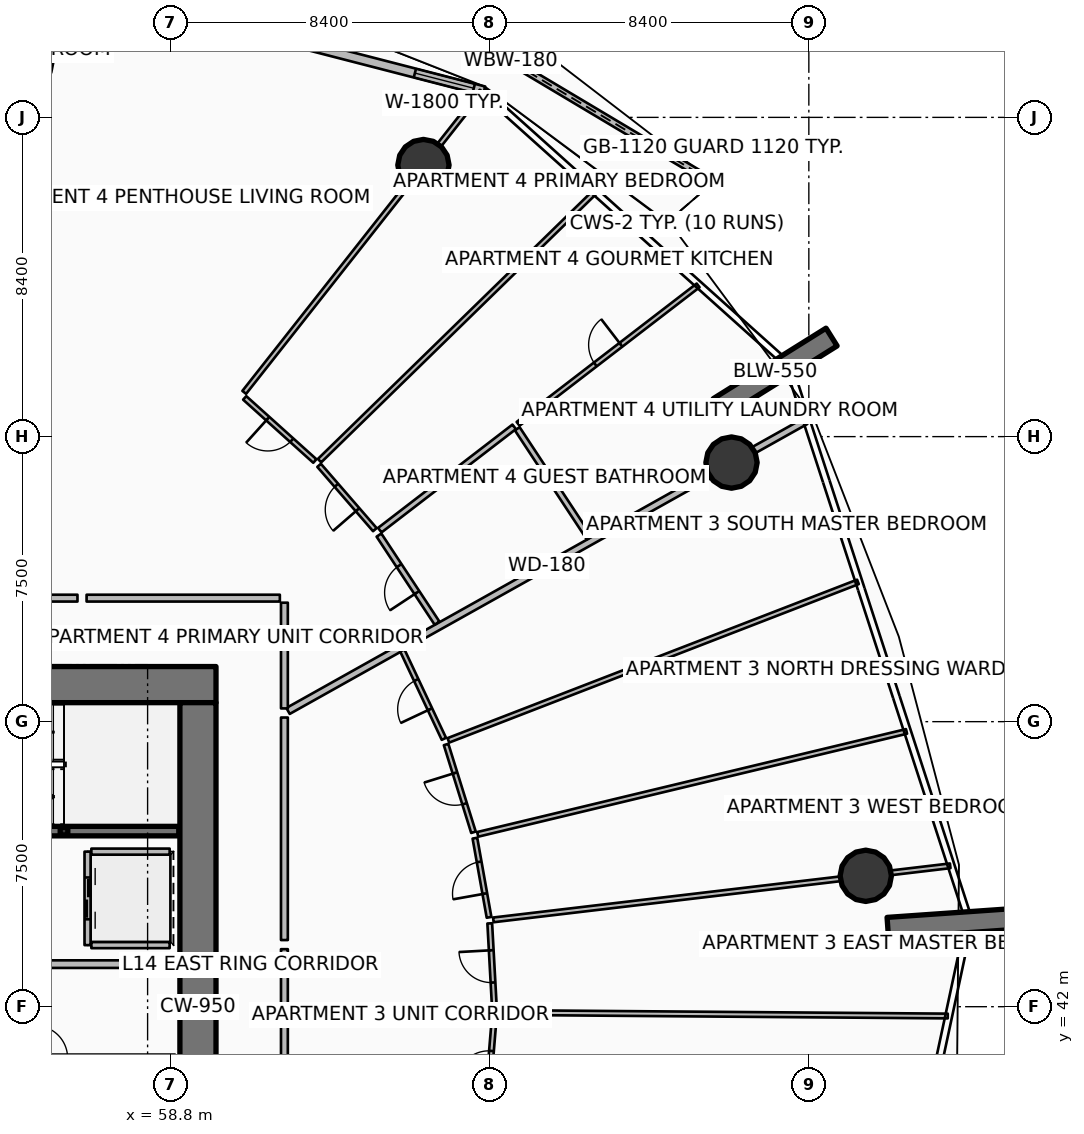
"""IFC4 building model, lengths in metres.
Left out: names, types, materials, properties, quantities, classifications, styles, units other than length and angle.
Written with IfcOpenShell. Run it as: python <this file> out.ifc"""

import sys

from ifc_helpers import new_model, si_unit, direction, frame, frame_2d, origin, origin_2d, place, context, subcontext, project, spatial, polyline, rectangle, hollow_rectangle, circle, outline, extrude, element, fill, save


model = new_model("IFC4")
c1 = context("Model", 3, precision=1e-05, world=origin(), true_north=direction((0.0, 1.0)))
c2 = subcontext(c1, "Body", "Model", "MODEL_VIEW")
j1 = project(units=[si_unit("LENGTHUNIT", "METRE"), si_unit("PLANEANGLEUNIT", "RADIAN")], contexts=[c1])
p1 = place(None, origin())
s1 = spatial("IfcSite", under=j1, at=p1, CompositionType="ELEMENT")
p2 = place(p1, origin())
s2 = spatial("IfcBuilding", under=s1, at=p2, CompositionType="ELEMENT")
p3 = place(p2, frame((0.0, 0.0, 60.15)))
s3 = spatial("IfcBuildingStorey", under=s2, at=p3, CompositionType="ELEMENT", Elevation=60.15)
p4 = place(p3, frame((49.95, 50.475, 0.0), z_axis=(0.0, 0.0, 1.0), x_axis=(1.0, 0.0, 0.0)))
e1 = element("IfcWall", 1, at=p4, inside=s3, PredefinedType="SHEAR", context=c2, shape_type="SweptSolid", body=[
    extrude(rectangle(XDim=10.05, YDim=0.95, at=frame_2d((5.025, 0.0))), origin(), (0.0, 0.0, 1.0), 3.75),
])
p5 = place(p3, frame((59.525, 34.0, 0.0), z_axis=(0.0, 0.0, 1.0), x_axis=(0.0, 1.0, 0.0)))
e2 = element("IfcWall", 2, at=p5, inside=s3, PredefinedType="SHEAR", context=c2, shape_type="SweptSolid", body=[
    extrude(rectangle(XDim=16.0, YDim=0.95, at=frame_2d((8.0, 0.0))), origin(), (0.0, 0.0, 1.0), 3.75),
])
p6 = place(p3, frame((56.0, 46.62, 0.0), z_axis=(0.0, 0.0, 1.0), x_axis=(1.0, 0.0, 0.0)))
e3 = element("IfcColumn", 3, at=p6, inside=s3, PredefinedType="COLUMN", context=c2, shape_type="SweptSolid", body=[
    extrude(hollow_rectangle(XDim=0.2, YDim=0.2, WallThickness=0.01, InnerFilletRadius=0.01, OuterFilletRadius=0.02, at=origin_2d()), origin(), (0.0, 0.0, 1.0), 1.67),
])
for number, where, z_axis, x_axis in (
    (4, (73.23, 57.765, 0.0), (0.0, 0.0, 1.0), (0.848, 0.53, 0.0)),
    (5, (77.678, 44.075, 0.0), (0.0, 0.0, 1.0), (0.998, 0.07, 0.0)),
):
    element("IfcWall", number, at=place(p3, frame(where, z_axis=z_axis, x_axis=x_axis)), inside=s3, PredefinedType="SOLIDWALL", context=c2, shape_type="SweptSolid", body=[
        extrude(rectangle(XDim=3.5, YDim=0.55, at=frame_2d((1.75, 0.0))), origin(), (0.0, 0.0, 1.0), 3.75),
    ])
for number, where, z_axis, x_axis in (
    (6, (73.565, 56.317, 0.0), (0.0, 0.0, 1.0), (1.0, 0.0, 0.0)),
    (7, (65.458, 64.146, 0.0), (0.0, 0.0, 1.0), (1.0, 0.0, 0.0)),
    (8, (77.098, 45.444, 0.0), (0.0, 0.0, 1.0), (1.0, 0.0, 0.0)),
):
    element("IfcColumn", number, at=place(p3, frame(where, z_axis=z_axis, x_axis=x_axis)), inside=s3, PredefinedType="COLUMN", context=c2, shape_type="SweptSolid", body=[
        extrude(circle(Radius=0.675, at=origin_2d()), origin(), (0.0, 0.0, 1.0), 3.5),
    ])
p7 = place(p3, frame((73.087, 63.693, 0.0), z_axis=(0.0, 0.0, 1.0), x_axis=(-0.858860948387, 0.512208816144, 0.0)))
e9 = element("IfcWall", 9, at=p7, inside=s3, PredefinedType="PARAPET", context=c2, shape_type="SweptSolid", body=[
    extrude(outline(polyline([(0.0, 0.0), (12.412, 0.0), (12.412, 1.348), (6.206, 1.182), (0.0, 1.12), (0.0, 0.0)])), frame((0.0, 0.09, 0.0), z_axis=(0.0, -1.0, 0.0), x_axis=(1.0, 0.0, 0.0)), (0.0, 0.0, 1.0), 0.18),
])
p8 = place(p3, frame((67.054, 66.096, 0.0), z_axis=(0.0, 0.0, 1.0), x_axis=(-0.96833871487, 0.249640007378, 0.0)))
e10 = element("IfcWall", 10, at=p8, inside=s3, PredefinedType="SOLIDWALL", context=c2, shape_type="SweptSolid", body=[
    extrude(rectangle(XDim=11.851, YDim=0.24, at=frame_2d((5.926, 0.0))), origin(), (0.0, 0.0, 1.0), 2.45),
])
p9 = place(p8, frame((9.631, 0.0, 0.0)))
e11 = element("IfcOpeningElement", 11, at=p9, cuts=e10, PredefinedType="OPENING", context=c2, shape_type="SweptSolid", body=[
    extrude(rectangle(XDim=1.45, YDim=2.15, at=frame_2d((0.725, 1.075))), frame((0.0, 0.13, 0.0), z_axis=(0.0, -1.0, 0.0), x_axis=(1.0, 0.0, 0.0)), (0.0, 0.0, 1.0), 0.26),
])
p10 = place(p8, frame((0.28, 0.0, 0.65)))
e12 = element("IfcOpeningElement", 12, at=p10, cuts=e10, PredefinedType="OPENING", context=c2, shape_type="SweptSolid", body=[
    extrude(rectangle(XDim=1.6, YDim=1.5, at=frame_2d((0.8, 0.75))), frame((0.0, 0.13, 0.0), z_axis=(0.0, -1.0, 0.0), x_axis=(1.0, 0.0, 0.0)), (0.0, 0.0, 1.0), 0.26),
])
p11 = place(p3, frame((51.48, 46.62, 0.0), z_axis=(0.0, 0.0, 1.0), x_axis=(1.0, 0.0, 0.0)))
e13 = element("IfcWall", 13, at=p11, inside=s3, PredefinedType="SOLIDWALL", context=c2, shape_type="SweptSolid", body=[
    extrude(rectangle(XDim=7.54, YDim=0.25, at=frame_2d((3.77, 0.0))), origin(), (0.0, 0.0, 1.0), 3.5),
])
p12 = place(p11, frame((0.3, 0.0, 0.0)))
e14 = element("IfcOpeningElement", 14, at=p12, cuts=e13, PredefinedType="OPENING", context=c2, shape_type="SweptSolid", body=[
    extrude(rectangle(XDim=1.55, YDim=2.15, at=frame_2d((0.775, 1.075))), frame((0.0, 0.135, 0.0), z_axis=(0.0, -1.0, 0.0), x_axis=(1.0, 0.0, 0.0)), (0.0, 0.0, 1.0), 0.27),
])
p13 = place(p3, frame((56.62, 46.08, 0.0), z_axis=(0.0, 0.0, 1.0), x_axis=(0.0, -1.0, 0.0)))
e15 = element("IfcWall", 15, at=p13, inside=s3, PredefinedType="PARTITIONING", context=c2, shape_type="SweptSolid", body=[
    extrude(rectangle(XDim=2.46, YDim=0.16, at=frame_2d((1.23, 0.0))), origin(), (0.0, 0.0, 1.0), 3.5),
])
p14 = place(p13, frame((0.68, 0.0, 0.0)))
e16 = element("IfcOpeningElement", 16, at=p14, cuts=e15, PredefinedType="OPENING", context=c2, shape_type="SweptSolid", body=[
    extrude(rectangle(XDim=1.1, YDim=2.1, at=frame_2d((0.55, 1.05))), frame((0.0, 0.09, 0.0), z_axis=(0.0, -1.0, 0.0), x_axis=(1.0, 0.0, 0.0)), (0.0, 0.0, 1.0), 0.18),
])
for number, where, z_axis, x_axis in (
    (17, (56.72, 46.08, 0.0), (0.0, 0.0, 1.0), (1.0, 0.0, 0.0)),
    (18, (56.72, 43.62, 0.0), (0.0, 0.0, 1.0), (1.0, 0.0, 0.0)),
):
    element("IfcWall", number, at=place(p3, frame(where, z_axis=z_axis, x_axis=x_axis)), inside=s3, PredefinedType="PARTITIONING", context=c2, shape_type="SweptSolid", body=[
        extrude(rectangle(XDim=2.06, YDim=0.16, at=frame_2d((1.03, 0.0))), origin(), (0.0, 0.0, 1.0), 3.5),
    ])
p15 = place(p3, frame((50.12, 43.12, 0.0), z_axis=(0.0, 0.0, 1.0), x_axis=(1.0, 0.0, 0.0)))
e19 = element("IfcWall", 19, at=p15, inside=s3, PredefinedType="PARTITIONING", context=c2, shape_type="SweptSolid", body=[
    extrude(rectangle(XDim=8.88, YDim=0.2, at=frame_2d((4.44, 0.0))), origin(), (0.0, 0.0, 1.0), 3.5),
])
p16 = place(p3, frame((61.896, 49.782, 0.0), z_axis=(0.0, 0.0, 1.0), x_axis=(0.872493215695, 0.488626225828, 0.0)))
e20 = element("IfcWall", 20, at=p16, inside=s3, PredefinedType="PARTITIONING", context=c2, shape_type="SweptSolid", body=[
    extrude(rectangle(XDim=15.612, YDim=0.18, at=frame_2d((7.806, 0.0))), origin(), (0.0, 0.0, 1.0), 2.867),
])
p17 = place(p3, frame((61.8, 38.228, 0.0), z_axis=(0.0, 0.0, 1.0), x_axis=(0.0, 1.0, 0.0)))
e21 = element("IfcWall", 21, at=p17, inside=s3, PredefinedType="PARTITIONING", context=c2, shape_type="SweptSolid", body=[
    extrude(rectangle(XDim=5.285, YDim=0.18, at=frame_2d((2.643, 0.0))), origin(), (0.0, 0.0, 1.0), 2.867),
])
p18 = place(p3, frame((67.422, 41.847, 0.0), z_axis=(0.0, 0.0, 1.0), x_axis=(0.999969106173, -0.007860451618, 0.0)))
e22 = element("IfcWall", 22, at=p18, inside=s3, PredefinedType="PARTITIONING", context=c2, shape_type="SweptSolid", body=[
    extrude(rectangle(XDim=11.833, YDim=0.125, at=frame_2d((5.917, 0.0))), origin(), (0.0, 0.0, 1.0), 2.94),
])
p19 = place(p3, frame((67.102, 39.055, 0.0), z_axis=(0.0, 0.0, 1.0), x_axis=(0.082325550285, 0.996605490538, 0.0)))
e23 = element("IfcWall", 23, at=p19, inside=s3, PredefinedType="PARTITIONING", context=c2, shape_type="SweptSolid", body=[
    extrude(rectangle(XDim=2.722, YDim=0.125, at=frame_2d((1.361, 0.0))), origin(), (0.0, 0.0, 1.0), 2.94),
])
p20 = place(p19, frame((0.936, 0.0, 0.0)))
e24 = element("IfcOpeningElement", 24, at=p20, cuts=e23, PredefinedType="OPENING", context=c2, shape_type="SweptSolid", body=[
    extrude(rectangle(XDim=0.85, YDim=2.06, at=frame_2d((0.425, 1.03))), frame((0.0, 0.073, 0.0), z_axis=(0.0, -1.0, 0.0), x_axis=(1.0, 0.0, 0.0)), (0.0, 0.0, 1.0), 0.145),
])
p21 = place(p3, frame((67.328, 41.928, 0.0), z_axis=(0.0, 0.0, 1.0), x_axis=(-0.054903584575, 0.998491660657, 0.0)))
e25 = element("IfcWall", 25, at=p21, inside=s3, PredefinedType="PARTITIONING", context=c2, shape_type="SweptSolid", body=[
    extrude(rectangle(XDim=2.268, YDim=0.125, at=frame_2d((1.134, 0.0))), origin(), (0.0, 0.0, 1.0), 2.867),
])
p22 = place(p21, frame((0.709, 0.0, 0.0)))
e26 = element("IfcOpeningElement", 26, at=p22, cuts=e25, PredefinedType="OPENING", context=c2, shape_type="SweptSolid", body=[
    extrude(rectangle(XDim=0.85, YDim=2.06, at=frame_2d((0.425, 1.03))), frame((0.0, 0.073, 0.0), z_axis=(0.0, -1.0, 0.0), x_axis=(1.0, 0.0, 0.0)), (0.0, 0.0, 1.0), 0.145),
])
p23 = place(p3, frame((61.8, 43.753, 0.0), z_axis=(0.0, 0.0, 1.0), x_axis=(0.0, 1.0, 0.0)))
e27 = element("IfcWall", 27, at=p23, inside=s3, PredefinedType="PARTITIONING", context=c2, shape_type="SweptSolid", body=[
    extrude(rectangle(XDim=5.855, YDim=0.18, at=frame_2d((2.927, 0.0))), origin(), (0.0, 0.0, 1.0), 2.867),
])
p24 = place(p3, frame((67.298, 44.284, 0.0), z_axis=(0.0, 0.0, 1.0), x_axis=(0.993068589749, 0.117536275483, 0.0)))
e28 = element("IfcWall", 28, at=p24, inside=s3, PredefinedType="PARTITIONING", context=c2, shape_type="SweptSolid", body=[
    extrude(rectangle(XDim=12.106, YDim=0.125, at=frame_2d((6.053, 0.0))), origin(), (0.0, 0.0, 1.0), 2.867),
])
p25 = place(p3, frame((66.886, 46.534, 0.0), z_axis=(0.0, 0.0, 1.0), x_axis=(0.972368393799, 0.233451722507, 0.0)))
e29 = element("IfcWall", 29, at=p25, inside=s3, PredefinedType="PARTITIONING", context=c2, shape_type="SweptSolid", body=[
    extrude(rectangle(XDim=11.605, YDim=0.125, at=frame_2d((5.802, 0.0))), origin(), (0.0, 0.0, 1.0), 2.94),
])
p26 = place(p3, frame((66.115, 49.008, 0.0), z_axis=(0.0, 0.0, 1.0), x_axis=(0.932641955578, 0.360803246514, 0.0)))
e30 = element("IfcWall", 30, at=p26, inside=s3, PredefinedType="PARTITIONING", context=c2, shape_type="SweptSolid", body=[
    extrude(rectangle(XDim=11.556, YDim=0.125, at=frame_2d((5.778, 0.0))), origin(), (0.0, 0.0, 1.0), 2.94),
])
p27 = place(p3, frame((67.185, 44.351, 0.0), z_axis=(0.0, 0.0, 1.0), x_axis=(-0.175726743029, 0.984438983271, 0.0)))
e31 = element("IfcWall", 31, at=p27, inside=s3, PredefinedType="PARTITIONING", context=c2, shape_type="SweptSolid", body=[
    extrude(rectangle(XDim=2.116, YDim=0.125, at=frame_2d((1.058, 0.0))), origin(), (0.0, 0.0, 1.0), 2.867),
])
p28 = place(p27, frame((0.633, 0.0, 0.0)))
e32 = element("IfcOpeningElement", 32, at=p28, cuts=e31, PredefinedType="OPENING", context=c2, shape_type="SweptSolid", body=[
    extrude(rectangle(XDim=0.85, YDim=2.06, at=frame_2d((0.425, 1.03))), frame((0.0, 0.073, 0.0), z_axis=(0.0, -1.0, 0.0), x_axis=(1.0, 0.0, 0.0)), (0.0, 0.0, 1.0), 0.145),
])
p29 = place(p3, frame((66.775, 46.59, 0.0), z_axis=(0.0, 0.0, 1.0), x_axis=(-0.297792299564, 0.954630685826, 0.0)))
e33 = element("IfcWall", 33, at=p29, inside=s3, PredefinedType="PARTITIONING", context=c2, shape_type="SweptSolid", body=[
    extrude(rectangle(XDim=2.419, YDim=0.125, at=frame_2d((1.21, 0.0))), origin(), (0.0, 0.0, 1.0), 2.94),
])
p30 = place(p29, frame((0.785, 0.0, 0.0)))
e34 = element("IfcOpeningElement", 34, at=p30, cuts=e33, PredefinedType="OPENING", context=c2, shape_type="SweptSolid", body=[
    extrude(rectangle(XDim=0.85, YDim=2.06, at=frame_2d((0.425, 1.03))), frame((0.0, 0.073, 0.0), z_axis=(0.0, -1.0, 0.0), x_axis=(1.0, 0.0, 0.0)), (0.0, 0.0, 1.0), 0.145),
])
p31 = place(p3, frame((65.997, 49.048, 0.0), z_axis=(0.0, 0.0, 1.0), x_axis=(-0.425774166793, 0.904829463983, 0.0)))
e35 = element("IfcWall", 35, at=p31, inside=s3, PredefinedType="PARTITIONING", context=c2, shape_type="SweptSolid", body=[
    extrude(rectangle(XDim=2.571, YDim=0.125, at=frame_2d((1.285, 0.0))), origin(), (0.0, 0.0, 1.0), 2.867),
])
p32 = place(p31, frame((0.86, 0.0, 0.0)))
e36 = element("IfcOpeningElement", 36, at=p32, cuts=e35, PredefinedType="OPENING", context=c2, shape_type="SweptSolid", body=[
    extrude(rectangle(XDim=0.85, YDim=2.06, at=frame_2d((0.425, 1.03))), frame((0.0, 0.073, 0.0), z_axis=(0.0, -1.0, 0.0), x_axis=(1.0, 0.0, 0.0)), (0.0, 0.0, 1.0), 0.145),
])
p33 = place(p3, frame((56.354, 52.75, 0.0), z_axis=(0.0, 0.0, 1.0), x_axis=(-1.0, 0.0, 0.0)))
e37 = element("IfcWall", 37, at=p33, inside=s3, PredefinedType="PARTITIONING", context=c2, shape_type="SweptSolid", body=[
    extrude(rectangle(XDim=5.203, YDim=0.18, at=frame_2d((2.601, 0.0))), origin(), (0.0, 0.0, 1.0), 2.867),
])
p34 = place(p33, frame((2.052, 0.0, 0.0)))
e38 = element("IfcOpeningElement", 38, at=p34, cuts=e37, PredefinedType="OPENING", context=c2, shape_type="SweptSolid", body=[
    extrude(rectangle(XDim=1.1, YDim=2.1, at=frame_2d((0.55, 1.05))), frame((0.0, 0.1, 0.0), z_axis=(0.0, -1.0, 0.0), x_axis=(1.0, 0.0, 0.0)), (0.0, 0.0, 1.0), 0.2),
])
p35 = place(p3, frame((61.8, 49.848, 0.0), z_axis=(0.0, 0.0, 1.0), x_axis=(0.0, 1.0, 0.0)))
e39 = element("IfcWall", 39, at=p35, inside=s3, PredefinedType="PARTITIONING", context=c2, shape_type="SweptSolid", body=[
    extrude(rectangle(XDim=2.781, YDim=0.18, at=frame_2d((1.391, 0.0))), origin(), (0.0, 0.0, 1.0), 2.867),
])
p36 = place(p3, frame((61.68, 52.75, 0.0), z_axis=(0.0, 0.0, 1.0), x_axis=(-1.0, 0.0, 0.0)))
e40 = element("IfcWall", 40, at=p36, inside=s3, PredefinedType="PARTITIONING", context=c2, shape_type="SweptSolid", body=[
    extrude(rectangle(XDim=5.085, YDim=0.18, at=frame_2d((2.543, 0.0))), origin(), (0.0, 0.0, 1.0), 2.867),
])
p37 = place(p3, frame((60.743, 58.164, 0.0), z_axis=(0.0, 0.0, 1.0), x_axis=(0.61907620874, 0.785330916093, 0.0)))
e41 = element("IfcWall", 41, at=p37, inside=s3, PredefinedType="PARTITIONING", context=c2, shape_type="SweptSolid", body=[
    extrude(rectangle(XDim=10.091, YDim=0.125, at=frame_2d((5.046, 0.0))), origin(), (0.0, 0.0, 1.0), 2.867),
])
p38 = place(p3, frame((65.816, 52.092, 0.0), z_axis=(0.0, 0.0, 1.0), x_axis=(-0.550532146696, 0.834813964578, 0.0)))
e42 = element("IfcWall", 42, at=p38, inside=s3, PredefinedType="PARTITIONING", context=c2, shape_type="SweptSolid", body=[
    extrude(rectangle(XDim=2.776, YDim=0.15, at=frame_2d((1.388, 0.0))), origin(), (0.0, 0.0, 1.0), 2.867),
])
p39 = place(p38, frame((0.963, 0.0, 0.0)))
e43 = element("IfcOpeningElement", 43, at=p39, cuts=e42, PredefinedType="OPENING", context=c2, shape_type="SweptSolid", body=[
    extrude(rectangle(XDim=0.85, YDim=2.06, at=frame_2d((0.425, 1.03))), frame((0.0, 0.085, 0.0), z_axis=(0.0, -1.0, 0.0), x_axis=(1.0, 0.0, 0.0)), (0.0, 0.0, 1.0), 0.17),
])
p40 = place(p3, frame((69.821, 54.335, 0.0), z_axis=(0.0, 0.0, 1.0), x_axis=(-0.550516877558, 0.834824033868, 0.0)))
e44 = element("IfcWall", 44, at=p40, inside=s3, PredefinedType="PARTITIONING", context=c2, shape_type="SweptSolid", body=[
    extrude(rectangle(XDim=3.44, YDim=0.15, at=frame_2d((1.72, 0.0))), origin(), (0.0, 0.0, 1.0), 2.867),
])
p41 = place(p3, frame((64.31, 54.539, 0.0), z_axis=(0.0, 0.0, 1.0), x_axis=(0.792803030826, 0.609477935871, 0.0)))
e45 = element("IfcWall", 45, at=p41, inside=s3, PredefinedType="PARTITIONING", context=c2, shape_type="SweptSolid", body=[
    extrude(rectangle(XDim=4.46, YDim=0.15, at=frame_2d((2.23, 0.0))), origin(), (0.0, 0.0, 1.0), 2.94),
])
p42 = place(p3, frame((67.949, 57.337, 0.0), z_axis=(0.0, 0.0, 1.0), x_axis=(0.792800135679, 0.609481701832, 0.0)))
e46 = element("IfcWall", 46, at=p42, inside=s3, PredefinedType="PARTITIONING", context=c2, shape_type="SweptSolid", body=[
    extrude(rectangle(XDim=5.976, YDim=0.125, at=frame_2d((2.988, 0.0))), origin(), (0.0, 0.0, 1.0), 2.94),
])
p43 = place(p42, frame((2.563, 0.0, 0.0)))
e47 = element("IfcOpeningElement", 47, at=p43, cuts=e46, PredefinedType="OPENING", context=c2, shape_type="SweptSolid", body=[
    extrude(rectangle(XDim=0.85, YDim=2.06, at=frame_2d((0.425, 1.03))), frame((0.0, 0.073, 0.0), z_axis=(0.0, -1.0, 0.0), x_axis=(1.0, 0.0, 0.0)), (0.0, 0.0, 1.0), 0.145),
])
p44 = place(p3, frame((62.725, 56.368, 0.0), z_axis=(0.0, 0.0, 1.0), x_axis=(0.715749552764, 0.698357056038, 0.0)))
e48 = element("IfcWall", 48, at=p44, inside=s3, PredefinedType="PARTITIONING", context=c2, shape_type="SweptSolid", body=[
    extrude(rectangle(XDim=10.107, YDim=0.125, at=frame_2d((5.053, 0.0))), origin(), (0.0, 0.0, 1.0), 2.94),
])
p45 = place(p3, frame((64.18, 54.552, 0.0), z_axis=(0.0, 0.0, 1.0), x_axis=(-0.654947139149, 0.75567469517, 0.0)))
e49 = element("IfcWall", 49, at=p45, inside=s3, PredefinedType="PARTITIONING", context=c2, shape_type="SweptSolid", body=[
    extrude(rectangle(XDim=2.24, YDim=0.125, at=frame_2d((1.12, 0.0))), origin(), (0.0, 0.0, 1.0), 2.94),
])
p46 = place(p45, frame((0.695, 0.0, 0.0)))
e50 = element("IfcOpeningElement", 50, at=p46, cuts=e49, PredefinedType="OPENING", context=c2, shape_type="SweptSolid", body=[
    extrude(rectangle(XDim=0.85, YDim=2.06, at=frame_2d((0.425, 1.03))), frame((0.0, 0.073, 0.0), z_axis=(0.0, -1.0, 0.0), x_axis=(1.0, 0.0, 0.0)), (0.0, 0.0, 1.0), 0.145),
])
p47 = place(p3, frame((62.601, 56.358, 0.0), z_axis=(0.0, 0.0, 1.0), x_axis=(-0.743435913228, 0.66880717918, 0.0)))
e51 = element("IfcWall", 51, at=p47, inside=s3, PredefinedType="PARTITIONING", context=c2, shape_type="SweptSolid", body=[
    extrude(rectangle(XDim=2.483, YDim=0.125, at=frame_2d((1.241, 0.0))), origin(), (0.0, 0.0, 1.0), 2.867),
])
p48 = place(p47, frame((0.816, 0.0, 0.0)))
e52 = element("IfcOpeningElement", 52, at=p48, cuts=e51, PredefinedType="OPENING", context=c2, shape_type="SweptSolid", body=[
    extrude(rectangle(XDim=0.85, YDim=2.06, at=frame_2d((0.425, 1.03))), frame((0.0, 0.073, 0.0), z_axis=(0.0, -1.0, 0.0), x_axis=(1.0, 0.0, 0.0)), (0.0, 0.0, 1.0), 0.145),
])
p49 = place(p10, origin())
e53 = element("IfcWindow", 53, at=p49, inside=s3, PartitioningType="SINGLE_PANEL", PredefinedType="WINDOW", context=c2, shape_type="SweptSolid", body=[
    extrude(rectangle(XDim=1.6, YDim=1.5, at=frame_2d((0.8, 0.75))), frame((0.0, 0.03, 0.0), z_axis=(0.0, -1.0, 0.0), x_axis=(1.0, 0.0, 0.0)), (0.0, 0.0, 1.0), 0.06),
])
fill(e12, e53)
p50 = place(p14, origin())
e54 = element("IfcDoor", 54, at=p50, inside=s3, OperationType="DOUBLE_DOOR_SLIDING", PredefinedType="DOOR", context=c2, shape_type="SweptSolid", body=[
    extrude(rectangle(XDim=1.1, YDim=2.1, at=frame_2d((0.55, 1.05))), frame((0.0, 0.025, 0.0), z_axis=(0.0, -1.0, 0.0), x_axis=(1.0, 0.0, 0.0)), (0.0, 0.0, 1.0), 0.05),
])
fill(e16, e54)
p51 = place(p20, origin())
e55 = element("IfcDoor", 55, at=p51, inside=s3, OperationType="SINGLE_SWING_LEFT", PredefinedType="DOOR", context=c2, shape_type="SweptSolid", body=[
    extrude(rectangle(XDim=0.85, YDim=2.06, at=frame_2d((0.425, 1.03))), frame((0.0, 0.025, 0.0), z_axis=(0.0, -1.0, 0.0), x_axis=(1.0, 0.0, 0.0)), (0.0, 0.0, 1.0), 0.05),
])
fill(e24, e55)
p52 = place(p22, origin())
e56 = element("IfcDoor", 56, at=p52, inside=s3, OperationType="SINGLE_SWING_RIGHT", PredefinedType="DOOR", context=c2, shape_type="SweptSolid", body=[
    extrude(rectangle(XDim=0.85, YDim=2.06, at=frame_2d((0.425, 1.03))), frame((0.0, 0.025, 0.0), z_axis=(0.0, -1.0, 0.0), x_axis=(1.0, 0.0, 0.0)), (0.0, 0.0, 1.0), 0.05),
])
fill(e26, e56)
p53 = place(p28, origin())
e57 = element("IfcDoor", 57, at=p53, inside=s3, OperationType="SINGLE_SWING_LEFT", PredefinedType="DOOR", context=c2, shape_type="SweptSolid", body=[
    extrude(rectangle(XDim=0.85, YDim=2.06, at=frame_2d((0.425, 1.03))), frame((0.0, 0.025, 0.0), z_axis=(0.0, -1.0, 0.0), x_axis=(1.0, 0.0, 0.0)), (0.0, 0.0, 1.0), 0.05),
])
fill(e32, e57)
p54 = place(p30, origin())
e58 = element("IfcDoor", 58, at=p54, inside=s3, OperationType="SINGLE_SWING_RIGHT", PredefinedType="DOOR", context=c2, shape_type="SweptSolid", body=[
    extrude(rectangle(XDim=0.85, YDim=2.06, at=frame_2d((0.425, 1.03))), frame((0.0, 0.025, 0.0), z_axis=(0.0, -1.0, 0.0), x_axis=(1.0, 0.0, 0.0)), (0.0, 0.0, 1.0), 0.05),
])
fill(e34, e58)
p55 = place(p32, origin())
e59 = element("IfcDoor", 59, at=p55, inside=s3, OperationType="SINGLE_SWING_LEFT", PredefinedType="DOOR", context=c2, shape_type="SweptSolid", body=[
    extrude(rectangle(XDim=0.85, YDim=2.06, at=frame_2d((0.425, 1.03))), frame((0.0, 0.025, 0.0), z_axis=(0.0, -1.0, 0.0), x_axis=(1.0, 0.0, 0.0)), (0.0, 0.0, 1.0), 0.05),
])
fill(e36, e59)
p56 = place(p39, origin())
e60 = element("IfcDoor", 60, at=p56, inside=s3, OperationType="SINGLE_SWING_LEFT", PredefinedType="DOOR", context=c2, shape_type="SweptSolid", body=[
    extrude(rectangle(XDim=0.85, YDim=2.06, at=frame_2d((0.425, 1.03))), frame((0.0, 0.025, 0.0), z_axis=(0.0, -1.0, 0.0), x_axis=(1.0, 0.0, 0.0)), (0.0, 0.0, 1.0), 0.05),
])
fill(e43, e60)
p57 = place(p43, origin())
e61 = element("IfcDoor", 61, at=p57, inside=s3, OperationType="SINGLE_SWING_RIGHT", PredefinedType="DOOR", context=c2, shape_type="SweptSolid", body=[
    extrude(rectangle(XDim=0.85, YDim=2.06, at=frame_2d((0.425, 1.03))), frame((0.0, 0.025, 0.0), z_axis=(0.0, -1.0, 0.0), x_axis=(1.0, 0.0, 0.0)), (0.0, 0.0, 1.0), 0.05),
])
fill(e47, e61)
p58 = place(p46, origin())
e62 = element("IfcDoor", 62, at=p58, inside=s3, OperationType="SINGLE_SWING_LEFT", PredefinedType="DOOR", context=c2, shape_type="SweptSolid", body=[
    extrude(rectangle(XDim=0.85, YDim=2.06, at=frame_2d((0.425, 1.03))), frame((0.0, 0.025, 0.0), z_axis=(0.0, -1.0, 0.0), x_axis=(1.0, 0.0, 0.0)), (0.0, 0.0, 1.0), 0.05),
])
fill(e50, e62)
p59 = place(p48, origin())
e63 = element("IfcDoor", 63, at=p59, inside=s3, OperationType="SINGLE_SWING_RIGHT", PredefinedType="DOOR", context=c2, shape_type="SweptSolid", body=[
    extrude(rectangle(XDim=0.85, YDim=2.06, at=frame_2d((0.425, 1.03))), frame((0.0, 0.025, 0.0), z_axis=(0.0, -1.0, 0.0), x_axis=(1.0, 0.0, 0.0)), (0.0, 0.0, 1.0), 0.05),
])
fill(e52, e63)
save(model, sys.argv[1])
